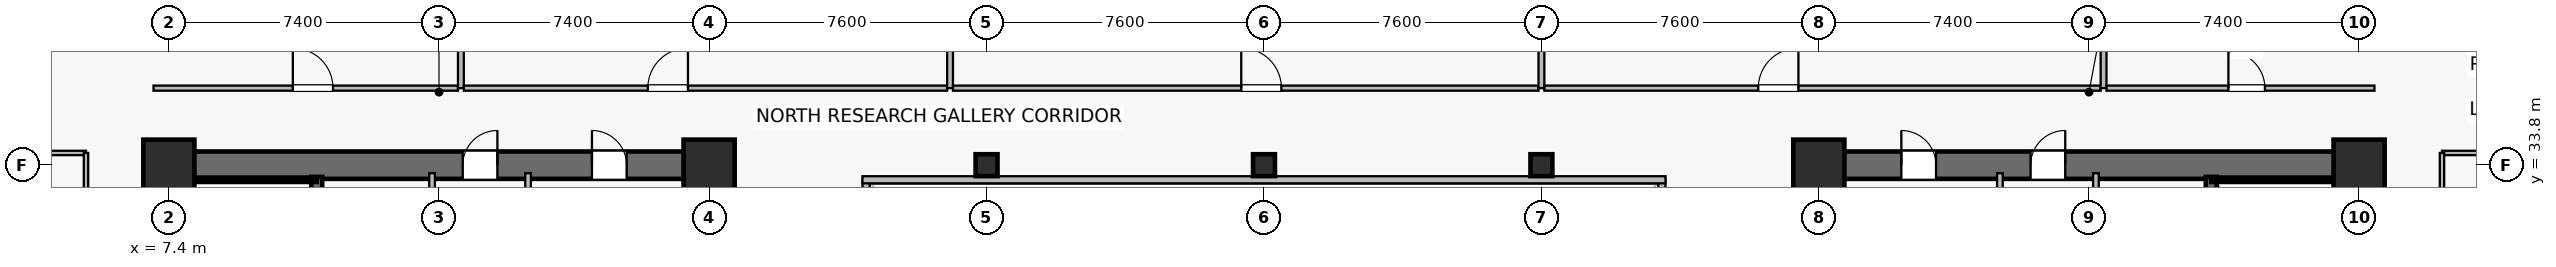
"""IFC4 building model, lengths in metres.
Left out: names, types, materials, properties, quantities, classifications, styles, units other than length and angle.
Written with IfcOpenShell. Run it as: python <this file> out.ifc"""

import sys

from ifc_helpers import new_model, si_unit, direction, frame, frame_2d, origin, origin_2d, place, context, subcontext, project, spatial, rectangle, hollow_rectangle, extrude, source, transform, mapped, element, fill, save


model = new_model("IFC4")
c1 = context("Model", 3, precision=1e-05, world=origin(), true_north=direction((0.0, 1.0)))
c2 = subcontext(c1, "Body", "Model", "MODEL_VIEW")
j1 = project(units=[si_unit("LENGTHUNIT", "METRE"), si_unit("PLANEANGLEUNIT", "RADIAN")], contexts=[c1])
p1 = place(None, origin())
s1 = spatial("IfcSite", under=j1, at=p1, CompositionType="ELEMENT")
p2 = place(p1, origin())
s2 = spatial("IfcBuilding", under=s1, at=p2, CompositionType="ELEMENT")
p3 = place(p2, frame((0.0, 0.0, 70.3)))
s3 = spatial("IfcBuildingStorey", under=s2, at=p3, CompositionType="ELEMENT", Elevation=70.3)
p4 = place(p3, frame((7.025, 33.8, 0.0), z_axis=(0.0, 0.0, 1.0), x_axis=(1.0, 0.0, 0.0)))
e1 = element("IfcWall", 1, at=p4, inside=s3, PredefinedType="SHEAR", context=c2, shape_type="SweptSolid", body=[
    extrude(rectangle(XDim=15.55, YDim=0.75, at=frame_2d((7.775, 0.0))), origin(), (0.0, 0.0, 1.0), 3.78),
])
p5 = place(p4, frame((8.425, 0.0, 0.0)))
e2 = element("IfcOpeningElement", 2, at=p5, cuts=e1, PredefinedType="OPENING", context=c2, shape_type="SweptSolid", body=[
    extrude(rectangle(XDim=0.95, YDim=2.15, at=frame_2d((0.475, 1.075))), frame((0.0, 0.385, 0.0), z_axis=(0.0, -1.0, 0.0), x_axis=(1.0, 0.0, 0.0)), (0.0, 0.0, 1.0), 0.77),
])
p6 = place(p4, frame((11.965, 0.0, 0.0)))
e3 = element("IfcOpeningElement", 3, at=p6, cuts=e1, PredefinedType="OPENING", context=c2, shape_type="SweptSolid", body=[
    extrude(rectangle(XDim=0.95, YDim=2.15, at=frame_2d((0.475, 1.075))), frame((0.0, 0.385, 0.0), z_axis=(0.0, -1.0, 0.0), x_axis=(1.0, 0.0, 0.0)), (0.0, 0.0, 1.0), 0.77),
])
p7 = place(p3, frame((7.4, 15.175, 0.0), z_axis=(0.0, 0.0, 1.0), x_axis=(0.0, 1.0, 0.0)))
e4 = element("IfcWall", 4, at=p7, inside=s3, PredefinedType="SHEAR", context=c2, shape_type="SweptSolid", body=[
    extrude(rectangle(XDim=18.25, YDim=0.75, at=frame_2d((9.125, 0.0))), origin(), (0.0, 0.0, 1.0), 3.78),
])
p8 = place(p3, frame((22.2, 15.175, 0.0), z_axis=(0.0, 0.0, 1.0), x_axis=(0.0, 1.0, 0.0)))
e5 = element("IfcWall", 5, at=p8, inside=s3, PredefinedType="SHEAR", context=c2, shape_type="SweptSolid", body=[
    extrude(rectangle(XDim=18.25, YDim=0.75, at=frame_2d((9.125, 0.0))), origin(), (0.0, 0.0, 1.0), 3.78),
])
p9 = place(p8, frame((3.375, 0.0, 0.0)))
e6 = element("IfcOpeningElement", 6, at=p9, cuts=e5, PredefinedType="OPENING", context=c2, shape_type="SweptSolid", body=[
    extrude(rectangle(XDim=1.42, YDim=2.2, at=frame_2d((0.71, 1.1))), frame((0.0, 0.385, 0.0), z_axis=(0.0, -1.0, 0.0), x_axis=(1.0, 0.0, 0.0)), (0.0, 0.0, 1.0), 0.77),
])
p10 = place(p3, frame((11.45, 24.85, 0.0), z_axis=(0.0, 0.0, 1.0), x_axis=(0.0, 1.0, 0.0)))
e7 = element("IfcWall", 7, at=p10, inside=s3, PredefinedType="SHEAR", context=c2, shape_type="SweptSolid", body=[
    extrude(rectangle(XDim=8.63, YDim=0.3, at=frame_2d((4.315, 0.0))), origin(), (0.0, 0.0, 1.0), 3.78),
])
p11 = place(p10, frame((0.42, 0.0, 0.0)))
e8 = element("IfcOpeningElement", 8, at=p11, cuts=e7, PredefinedType="OPENING", context=c2, shape_type="SweptSolid", body=[
    extrude(rectangle(XDim=1.1, YDim=2.15, at=frame_2d((0.55, 1.075))), frame((0.0, 0.16, 0.0), z_axis=(0.0, -1.0, 0.0), x_axis=(1.0, 0.0, 0.0)), (0.0, 0.0, 1.0), 0.32),
])
p12 = place(p3, frame((7.73, 33.4, 0.0), z_axis=(0.0, 0.0, 1.0), x_axis=(1.0, 0.0, 0.0)))
e9 = element("IfcWall", 9, at=p12, inside=s3, PredefinedType="SOLIDWALL", context=c2, shape_type="SweptSolid", body=[
    extrude(rectangle(XDim=3.72, YDim=0.12, at=frame_2d((1.86, 0.0))), origin(), (0.0, 0.0, 1.0), 3.78),
])
p13 = place(p3, frame((52.225, 33.8, 0.0), z_axis=(0.0, 0.0, 1.0), x_axis=(1.0, 0.0, 0.0)))
e10 = element("IfcWall", 10, at=p13, inside=s3, PredefinedType="SHEAR", context=c2, shape_type="SweptSolid", body=[
    extrude(rectangle(XDim=15.55, YDim=0.75, at=frame_2d((7.775, 0.0))), origin(), (0.0, 0.0, 1.0), 3.78),
])
p14 = place(p13, frame((6.175, 0.0, 0.0)))
e11 = element("IfcOpeningElement", 11, at=p14, cuts=e10, PredefinedType="OPENING", context=c2, shape_type="SweptSolid", body=[
    extrude(rectangle(XDim=0.95, YDim=2.15, at=frame_2d((0.475, 1.075))), frame((0.0, 0.385, 0.0), z_axis=(0.0, -1.0, 0.0), x_axis=(1.0, 0.0, 0.0)), (0.0, 0.0, 1.0), 0.77),
])
p15 = place(p13, frame((2.635, 0.0, 0.0)))
e12 = element("IfcOpeningElement", 12, at=p15, cuts=e10, PredefinedType="OPENING", context=c2, shape_type="SweptSolid", body=[
    extrude(rectangle(XDim=0.95, YDim=2.15, at=frame_2d((0.475, 1.075))), frame((0.0, 0.385, 0.0), z_axis=(0.0, -1.0, 0.0), x_axis=(1.0, 0.0, 0.0)), (0.0, 0.0, 1.0), 0.77),
])
p16 = place(p3, frame((52.6, 15.175, 0.0), z_axis=(0.0, 0.0, 1.0), x_axis=(0.0, 1.0, 0.0)))
e13 = element("IfcWall", 13, at=p16, inside=s3, PredefinedType="SHEAR", context=c2, shape_type="SweptSolid", body=[
    extrude(rectangle(XDim=18.25, YDim=0.75, at=frame_2d((9.125, 0.0))), origin(), (0.0, 0.0, 1.0), 3.78),
])
p17 = place(p16, frame((3.375, 0.0, 0.0)))
e14 = element("IfcOpeningElement", 14, at=p17, cuts=e13, PredefinedType="OPENING", context=c2, shape_type="SweptSolid", body=[
    extrude(rectangle(XDim=1.42, YDim=2.2, at=frame_2d((0.71, 1.1))), frame((0.0, 0.385, 0.0), z_axis=(0.0, -1.0, 0.0), x_axis=(1.0, 0.0, 0.0)), (0.0, 0.0, 1.0), 0.77),
])
p18 = place(p3, frame((67.4, 15.175, 0.0), z_axis=(0.0, 0.0, 1.0), x_axis=(0.0, 1.0, 0.0)))
e15 = element("IfcWall", 15, at=p18, inside=s3, PredefinedType="SHEAR", context=c2, shape_type="SweptSolid", body=[
    extrude(rectangle(XDim=18.25, YDim=0.75, at=frame_2d((9.125, 0.0))), origin(), (0.0, 0.0, 1.0), 3.78),
])
p19 = place(p3, frame((63.35, 24.85, 0.0), z_axis=(0.0, 0.0, 1.0), x_axis=(0.0, 1.0, 0.0)))
e16 = element("IfcWall", 16, at=p19, inside=s3, PredefinedType="SHEAR", context=c2, shape_type="SweptSolid", body=[
    extrude(rectangle(XDim=8.63, YDim=0.3, at=frame_2d((4.315, 0.0))), origin(), (0.0, 0.0, 1.0), 3.78),
])
p20 = place(p19, frame((0.42, 0.0, 0.0)))
e17 = element("IfcOpeningElement", 17, at=p20, cuts=e16, PredefinedType="OPENING", context=c2, shape_type="SweptSolid", body=[
    extrude(rectangle(XDim=1.1, YDim=2.15, at=frame_2d((0.55, 1.075))), frame((0.0, 0.16, 0.0), z_axis=(0.0, -1.0, 0.0), x_axis=(1.0, 0.0, 0.0)), (0.0, 0.0, 1.0), 0.32),
])
p21 = place(p3, frame((63.35, 33.4, 0.0), z_axis=(0.0, 0.0, 1.0), x_axis=(1.0, 0.0, 0.0)))
e18 = element("IfcWall", 18, at=p21, inside=s3, PredefinedType="SOLIDWALL", context=c2, shape_type="SweptSolid", body=[
    extrude(rectangle(XDim=3.72, YDim=0.12, at=frame_2d((1.86, 0.0))), origin(), (0.0, 0.0, 1.0), 3.78),
])
m1 = source(origin(), c2, "Body", "SweptSolid", [
    extrude(rectangle(XDim=1.4, YDim=1.4, at=origin_2d()), origin(), (0.0, 0.0, 1.0), 4.1),
])
for number, where, z_axis, x_axis in (
    (19, (7.4, 33.8, 0.0), (0.0, 0.0, 1.0), (1.0, 0.0, 0.0)),
    (20, (22.2, 33.8, 0.0), (0.0, 0.0, 1.0), (1.0, 0.0, 0.0)),
    (21, (52.6, 33.8, 0.0), (0.0, 0.0, 1.0), (1.0, 0.0, 0.0)),
    (22, (67.4, 33.8, 0.0), (0.0, 0.0, 1.0), (1.0, 0.0, 0.0)),
):
    element("IfcColumn", number, at=place(p3, frame(where, z_axis=z_axis, x_axis=x_axis)), inside=s3, PredefinedType="COLUMN", context=c2, shape_type="MappedRepresentation", body=[
        mapped(m1, transform((0.0, 0.0, 0.0), scale=1.0)),
    ])
m2 = source(origin(), c2, "Body", "SweptSolid", [
    extrude(hollow_rectangle(XDim=0.6, YDim=0.6, WallThickness=0.028, at=origin_2d()), origin(), (0.0, 0.0, 1.0), 4.1),
])
for number, where, z_axis, x_axis in (
    (23, (29.8, 33.8, 0.0), (0.0, 0.0, 1.0), (1.0, 0.0, 0.0)),
    (24, (37.4, 33.8, 0.0), (0.0, 0.0, 1.0), (1.0, 0.0, 0.0)),
    (25, (45.0, 33.8, 0.0), (0.0, 0.0, 1.0), (1.0, 0.0, 0.0)),
):
    element("IfcColumn", number, at=place(p3, frame(where, z_axis=z_axis, x_axis=x_axis)), inside=s3, PredefinedType="COLUMN", context=c2, shape_type="MappedRepresentation", body=[
        mapped(m2, transform((0.0, 0.0, 0.0), scale=1.0)),
    ])
p22 = place(p3, frame((14.61, 29.65, 0.0), z_axis=(0.0, 0.0, 1.0), x_axis=(0.0, 1.0, 0.0)))
e26 = element("IfcWall", 26, at=p22, inside=s3, PredefinedType="PLUMBINGWALL", context=c2, shape_type="SweptSolid", body=[
    extrude(rectangle(XDim=3.93, YDim=0.155, at=frame_2d((1.965, 0.0))), origin(), (0.0, 0.0, 1.0), 3.115),
])
p23 = place(p3, frame((17.24, 29.65, 0.0), z_axis=(0.0, 0.0, 1.0), x_axis=(0.0, 1.0, 0.0)))
e27 = element("IfcWall", 27, at=p23, inside=s3, PredefinedType="PLUMBINGWALL", context=c2, shape_type="SweptSolid", body=[
    extrude(rectangle(XDim=3.93, YDim=0.155, at=frame_2d((1.965, 0.0))), origin(), (0.0, 0.0, 1.0), 3.78),
])
p24 = place(p3, frame((60.19, 29.65, 0.0), z_axis=(0.0, 0.0, 1.0), x_axis=(0.0, 1.0, 0.0)))
e28 = element("IfcWall", 28, at=p24, inside=s3, PredefinedType="PLUMBINGWALL", context=c2, shape_type="SweptSolid", body=[
    extrude(rectangle(XDim=3.93, YDim=0.155, at=frame_2d((1.965, 0.0))), origin(), (0.0, 0.0, 1.0), 3.115),
])
p25 = place(p3, frame((57.56, 29.65, 0.0), z_axis=(0.0, 0.0, 1.0), x_axis=(0.0, 1.0, 0.0)))
e29 = element("IfcWall", 29, at=p25, inside=s3, PredefinedType="PLUMBINGWALL", context=c2, shape_type="SweptSolid", body=[
    extrude(rectangle(XDim=3.93, YDim=0.155, at=frame_2d((1.965, 0.0))), origin(), (0.0, 0.0, 1.0), 3.78),
])
p26 = place(p3, frame((26.5, 15.2, 0.0), z_axis=(0.0, 0.0, 1.0), x_axis=(0.0, 1.0, 0.0)))
e30 = element("IfcWall", 30, at=p26, inside=s3, PredefinedType="SOLIDWALL", context=c2, shape_type="SweptSolid", body=[
    extrude(rectangle(XDim=18.2, YDim=0.195, at=frame_2d((9.1, 0.0))), origin(), (0.0, 0.0, 1.0), 3.78),
])
p27 = place(p26, frame((1.8, 0.0, 0.9)))
e31 = element("IfcOpeningElement", 31, at=p27, cuts=e30, PredefinedType="OPENING", context=c2, shape_type="SweptSolid", body=[
    extrude(rectangle(XDim=1.2, YDim=1.35, at=frame_2d((0.6, 0.675))), frame((0.0, 0.107, 0.0), z_axis=(0.0, -1.0, 0.0), x_axis=(1.0, 0.0, 0.0)), (0.0, 0.0, 1.0), 0.215),
])
p28 = place(p26, frame((13.2, 0.0, 0.9)))
e32 = element("IfcOpeningElement", 32, at=p28, cuts=e30, PredefinedType="OPENING", context=c2, shape_type="SweptSolid", body=[
    extrude(rectangle(XDim=1.2, YDim=1.35, at=frame_2d((0.6, 0.675))), frame((0.0, 0.107, 0.0), z_axis=(0.0, -1.0, 0.0), x_axis=(1.0, 0.0, 0.0)), (0.0, 0.0, 1.0), 0.215),
])
p29 = place(p3, frame((48.3, 15.2, 0.0), z_axis=(0.0, 0.0, 1.0), x_axis=(0.0, 1.0, 0.0)))
e33 = element("IfcWall", 33, at=p29, inside=s3, PredefinedType="SOLIDWALL", context=c2, shape_type="SweptSolid", body=[
    extrude(rectangle(XDim=18.2, YDim=0.195, at=frame_2d((9.1, 0.0))), origin(), (0.0, 0.0, 1.0), 3.78),
])
p30 = place(p29, frame((1.8, 0.0, 0.9)))
e34 = element("IfcOpeningElement", 34, at=p30, cuts=e33, PredefinedType="OPENING", context=c2, shape_type="SweptSolid", body=[
    extrude(rectangle(XDim=1.2, YDim=1.35, at=frame_2d((0.6, 0.675))), frame((0.0, 0.107, 0.0), z_axis=(0.0, -1.0, 0.0), x_axis=(1.0, 0.0, 0.0)), (0.0, 0.0, 1.0), 0.215),
])
p31 = place(p29, frame((13.2, 0.0, 0.9)))
e35 = element("IfcOpeningElement", 35, at=p31, cuts=e33, PredefinedType="OPENING", context=c2, shape_type="SweptSolid", body=[
    extrude(rectangle(XDim=1.2, YDim=1.35, at=frame_2d((0.6, 0.675))), frame((0.0, 0.107, 0.0), z_axis=(0.0, -1.0, 0.0), x_axis=(1.0, 0.0, 0.0)), (0.0, 0.0, 1.0), 0.215),
])
p32 = place(p3, frame((26.4, 33.4, 0.0), z_axis=(0.0, 0.0, 1.0), x_axis=(1.0, 0.0, 0.0)))
e36 = element("IfcWall", 36, at=p32, inside=s3, PredefinedType="SOLIDWALL", context=c2, shape_type="SweptSolid", body=[
    extrude(rectangle(XDim=22.0, YDim=0.195, at=frame_2d((11.0, 0.0))), origin(), (0.0, 0.0, 1.0), 3.78),
])
p33 = place(p3, frame((6.98, 35.91, 0.0), z_axis=(0.0, 0.0, 1.0), x_axis=(1.0, 0.0, 0.0)))
e37 = element("IfcWall", 37, at=p33, inside=s3, PredefinedType="PARTITIONING", context=c2, shape_type="SweptSolid", body=[
    extrude(rectangle(XDim=8.34, YDim=0.14, at=frame_2d((4.17, 0.0))), origin(), (0.0, 0.0, 1.0), 3.115),
])
p34 = place(p33, frame((3.816, 0.0, 0.0)))
e38 = element("IfcOpeningElement", 38, at=p34, cuts=e37, PredefinedType="OPENING", context=c2, shape_type="SweptSolid", body=[
    extrude(rectangle(XDim=1.1, YDim=2.18, at=frame_2d((0.55, 1.09))), frame((0.0, 0.08, 0.0), z_axis=(0.0, -1.0, 0.0), x_axis=(1.0, 0.0, 0.0)), (0.0, 0.0, 1.0), 0.16),
])
p35 = place(p3, frame((15.4, 35.91, 0.0), z_axis=(0.0, 0.0, 1.0), x_axis=(0.0, 1.0, 0.0)))
e39 = element("IfcWall", 39, at=p35, inside=s3, PredefinedType="PARTITIONING", context=c2, shape_type="SweptSolid", body=[
    extrude(rectangle(XDim=12.58, YDim=0.16, at=frame_2d((6.29, 0.0))), origin(), (0.0, 0.0, 1.0), 3.015),
])
p36 = place(p3, frame((15.48, 35.91, 0.0), z_axis=(0.0, 0.0, 1.0), x_axis=(1.0, 0.0, 0.0)))
e40 = element("IfcWall", 40, at=p36, inside=s3, PredefinedType="PARTITIONING", context=c2, shape_type="SweptSolid", body=[
    extrude(rectangle(XDim=13.24, YDim=0.14, at=frame_2d((6.62, 0.0))), origin(), (0.0, 0.0, 1.0), 3.115),
])
p37 = place(p36, frame((5.04, 0.0, 0.0)))
e41 = element("IfcOpeningElement", 41, at=p37, cuts=e40, PredefinedType="OPENING", context=c2, shape_type="SweptSolid", body=[
    extrude(rectangle(XDim=1.1, YDim=2.18, at=frame_2d((0.55, 1.09))), frame((0.0, 0.08, 0.0), z_axis=(0.0, -1.0, 0.0), x_axis=(1.0, 0.0, 0.0)), (0.0, 0.0, 1.0), 0.16),
])
p38 = place(p3, frame((28.8, 35.91, 0.0), z_axis=(0.0, 0.0, 1.0), x_axis=(0.0, 1.0, 0.0)))
e42 = element("IfcWall", 42, at=p38, inside=s3, PredefinedType="PARTITIONING", context=c2, shape_type="SweptSolid", body=[
    extrude(rectangle(XDim=11.38, YDim=0.16, at=frame_2d((5.69, 0.0))), origin(), (0.0, 0.0, 1.0), 3.015),
])
p39 = place(p3, frame((28.88, 35.91, 0.0), z_axis=(0.0, 0.0, 1.0), x_axis=(1.0, 0.0, 0.0)))
e43 = element("IfcWall", 43, at=p39, inside=s3, PredefinedType="PARTITIONING", context=c2, shape_type="SweptSolid", body=[
    extrude(rectangle(XDim=16.04, YDim=0.14, at=frame_2d((8.02, 0.0))), origin(), (0.0, 0.0, 1.0), 3.115),
])
p40 = place(p39, frame((7.897, 0.0, 0.0)))
e44 = element("IfcOpeningElement", 44, at=p40, cuts=e43, PredefinedType="OPENING", context=c2, shape_type="SweptSolid", body=[
    extrude(rectangle(XDim=1.1, YDim=2.18, at=frame_2d((0.55, 1.09))), frame((0.0, 0.08, 0.0), z_axis=(0.0, -1.0, 0.0), x_axis=(1.0, 0.0, 0.0)), (0.0, 0.0, 1.0), 0.16),
])
p41 = place(p3, frame((45.0, 35.91, 0.0), z_axis=(0.0, 0.0, 1.0), x_axis=(0.0, 1.0, 0.0)))
e45 = element("IfcWall", 45, at=p41, inside=s3, PredefinedType="PARTITIONING", context=c2, shape_type="SweptSolid", body=[
    extrude(rectangle(XDim=11.38, YDim=0.16, at=frame_2d((5.69, 0.0))), origin(), (0.0, 0.0, 1.0), 3.015),
])
p42 = place(p3, frame((45.08, 35.91, 0.0), z_axis=(0.0, 0.0, 1.0), x_axis=(1.0, 0.0, 0.0)))
e46 = element("IfcWall", 46, at=p42, inside=s3, PredefinedType="PARTITIONING", context=c2, shape_type="SweptSolid", body=[
    extrude(rectangle(XDim=15.24, YDim=0.14, at=frame_2d((7.62, 0.0))), origin(), (0.0, 0.0, 1.0), 3.115),
])
p43 = place(p42, frame((5.86, 0.0, 0.0)))
e47 = element("IfcOpeningElement", 47, at=p43, cuts=e46, PredefinedType="OPENING", context=c2, shape_type="SweptSolid", body=[
    extrude(rectangle(XDim=1.1, YDim=2.18, at=frame_2d((0.55, 1.09))), frame((0.0, 0.08, 0.0), z_axis=(0.0, -1.0, 0.0), x_axis=(1.0, 0.0, 0.0)), (0.0, 0.0, 1.0), 0.16),
])
p44 = place(p3, frame((60.4, 35.91, 0.0), z_axis=(0.0, 0.0, 1.0), x_axis=(0.0, 1.0, 0.0)))
e48 = element("IfcWall", 48, at=p44, inside=s3, PredefinedType="PARTITIONING", context=c2, shape_type="SweptSolid", body=[
    extrude(rectangle(XDim=12.58, YDim=0.16, at=frame_2d((6.29, 0.0))), origin(), (0.0, 0.0, 1.0), 3.015),
])
p45 = place(p3, frame((60.48, 35.91, 0.0), z_axis=(0.0, 0.0, 1.0), x_axis=(1.0, 0.0, 0.0)))
e49 = element("IfcWall", 49, at=p45, inside=s3, PredefinedType="PARTITIONING", context=c2, shape_type="SweptSolid", body=[
    extrude(rectangle(XDim=7.34, YDim=0.14, at=frame_2d((3.67, 0.0))), origin(), (0.0, 0.0, 1.0), 3.265),
])
p46 = place(p45, frame((3.339, 0.0, 0.0)))
e50 = element("IfcOpeningElement", 50, at=p46, cuts=e49, PredefinedType="OPENING", context=c2, shape_type="SweptSolid", body=[
    extrude(rectangle(XDim=1.0, YDim=2.15, at=frame_2d((0.5, 1.075))), frame((0.0, 0.08, 0.0), z_axis=(0.0, -1.0, 0.0), x_axis=(1.0, 0.0, 0.0)), (0.0, 0.0, 1.0), 0.16),
])
p47 = place(p3, frame((0.11, 34.135, 0.0), z_axis=(0.0, 0.0, 1.0), x_axis=(1.0, 0.0, 0.0)))
e51 = element("IfcWall", 51, at=p47, inside=s3, PredefinedType="PARTITIONING", context=c2, shape_type="SweptSolid", body=[
    extrude(rectangle(XDim=5.02, YDim=0.12, at=frame_2d((2.51, 0.0))), origin(), (0.0, 0.0, 1.0), 3.78),
])
p48 = place(p3, frame((5.13, 14.465, 0.0), z_axis=(0.0, 0.0, 1.0), x_axis=(0.0, 1.0, 0.0)))
e52 = element("IfcWall", 52, at=p48, inside=s3, PredefinedType="PARTITIONING", context=c2, shape_type="SweptSolid", body=[
    extrude(rectangle(XDim=19.67, YDim=0.12, at=frame_2d((9.835, 0.0))), origin(), (0.0, 0.0, 1.0), 3.78),
])
p49 = place(p48, frame((9.385, 0.0, 0.0)))
e53 = element("IfcOpeningElement", 53, at=p49, cuts=e52, PredefinedType="OPENING", context=c2, shape_type="SweptSolid", body=[
    extrude(rectangle(XDim=0.9, YDim=2.1, at=frame_2d((0.45, 1.05))), frame((0.0, 0.07, 0.0), z_axis=(0.0, -1.0, 0.0), x_axis=(1.0, 0.0, 0.0)), (0.0, 0.0, 1.0), 0.14),
])
p50 = place(p3, frame((69.67, 34.135, 0.0), z_axis=(0.0, 0.0, 1.0), x_axis=(1.0, 0.0, 0.0)))
e54 = element("IfcWall", 54, at=p50, inside=s3, PredefinedType="PARTITIONING", context=c2, shape_type="SweptSolid", body=[
    extrude(rectangle(XDim=5.02, YDim=0.12, at=frame_2d((2.51, 0.0))), origin(), (0.0, 0.0, 1.0), 3.78),
])
p51 = place(p3, frame((69.67, 28.46, 0.0), z_axis=(0.0, 0.0, 1.0), x_axis=(0.0, 1.0, 0.0)))
e55 = element("IfcWall", 55, at=p51, inside=s3, PredefinedType="PARTITIONING", context=c2, shape_type="SweptSolid", body=[
    extrude(rectangle(XDim=5.675, YDim=0.12, at=frame_2d((2.837, 0.0))), origin(), (0.0, 0.0, 1.0), 3.78),
])
p52 = place(p51, frame((2.387, 0.0, 0.0)))
e56 = element("IfcOpeningElement", 56, at=p52, cuts=e55, PredefinedType="OPENING", context=c2, shape_type="SweptSolid", body=[
    extrude(rectangle(XDim=0.9, YDim=2.1, at=frame_2d((0.45, 1.05))), frame((0.0, 0.07, 0.0), z_axis=(0.0, -1.0, 0.0), x_axis=(1.0, 0.0, 0.0)), (0.0, 0.0, 1.0), 0.14),
])
m3 = source(origin(), c2, "Body", "SweptSolid", [
    extrude(rectangle(XDim=0.95, YDim=2.15, at=frame_2d((0.475, 1.075))), frame((0.0, 0.025, 0.0), z_axis=(0.0, -1.0, 0.0), x_axis=(1.0, 0.0, 0.0)), (0.0, 0.0, 1.0), 0.05),
])
p53 = place(p5, origin())
e57 = element("IfcDoor", 57, at=p53, inside=s3, OperationType="SINGLE_SWING_RIGHT", PredefinedType="DOOR", context=c2, shape_type="MappedRepresentation", body=[
    mapped(m3, transform((0.0, 0.0, 0.0), scale=1.0)),
])
fill(e2, e57)
p54 = place(p6, origin())
e58 = element("IfcDoor", 58, at=p54, inside=s3, OperationType="SINGLE_SWING_LEFT", PredefinedType="DOOR", context=c2, shape_type="MappedRepresentation", body=[
    mapped(m3, transform((0.0, 0.0, 0.0), scale=1.0)),
])
fill(e3, e58)
p55 = place(p14, origin())
e59 = element("IfcDoor", 59, at=p55, inside=s3, OperationType="SINGLE_SWING_RIGHT", PredefinedType="DOOR", context=c2, shape_type="MappedRepresentation", body=[
    mapped(m3, transform((0.0, 0.0, 0.0), scale=1.0)),
])
fill(e11, e59)
p56 = place(p15, origin())
e60 = element("IfcDoor", 60, at=p56, inside=s3, OperationType="SINGLE_SWING_LEFT", PredefinedType="DOOR", context=c2, shape_type="MappedRepresentation", body=[
    mapped(m3, transform((0.0, 0.0, 0.0), scale=1.0)),
])
fill(e12, e60)
m4 = source(origin(), c2, "Body", "SweptSolid", [
    extrude(rectangle(XDim=1.1, YDim=2.18, at=frame_2d((0.55, 1.09))), frame((0.0, 0.025, 0.0), z_axis=(0.0, -1.0, 0.0), x_axis=(1.0, 0.0, 0.0)), (0.0, 0.0, 1.0), 0.05),
])
p57 = place(p34, origin())
e61 = element("IfcDoor", 61, at=p57, inside=s3, OperationType="SINGLE_SWING_LEFT", PredefinedType="DOOR", context=c2, shape_type="MappedRepresentation", body=[
    mapped(m4, transform((0.0, 0.0, 0.0), scale=1.0)),
])
fill(e38, e61)
p58 = place(p37, origin())
e62 = element("IfcDoor", 62, at=p58, inside=s3, OperationType="SINGLE_SWING_RIGHT", PredefinedType="DOOR", context=c2, shape_type="MappedRepresentation", body=[
    mapped(m4, transform((0.0, 0.0, 0.0), scale=1.0)),
])
fill(e41, e62)
p59 = place(p40, origin())
e63 = element("IfcDoor", 63, at=p59, inside=s3, OperationType="SINGLE_SWING_LEFT", PredefinedType="DOOR", context=c2, shape_type="MappedRepresentation", body=[
    mapped(m4, transform((0.0, 0.0, 0.0), scale=1.0)),
])
fill(e44, e63)
p60 = place(p43, origin())
e64 = element("IfcDoor", 64, at=p60, inside=s3, OperationType="SINGLE_SWING_RIGHT", PredefinedType="DOOR", context=c2, shape_type="MappedRepresentation", body=[
    mapped(m4, transform((0.0, 0.0, 0.0), scale=1.0)),
])
fill(e47, e64)
m5 = source(origin(), c2, "Body", "SweptSolid", [
    extrude(rectangle(XDim=1.0, YDim=2.15, at=frame_2d((0.5, 1.075))), frame((0.0, 0.025, 0.0), z_axis=(0.0, -1.0, 0.0), x_axis=(1.0, 0.0, 0.0)), (0.0, 0.0, 1.0), 0.05),
])
p61 = place(p46, origin())
e65 = element("IfcDoor", 65, at=p61, inside=s3, OperationType="SINGLE_SWING_LEFT", PredefinedType="DOOR", context=c2, shape_type="MappedRepresentation", body=[
    mapped(m5, transform((0.0, 0.0, 0.0), scale=1.0)),
])
fill(e50, e65)
save(model, sys.argv[1])
